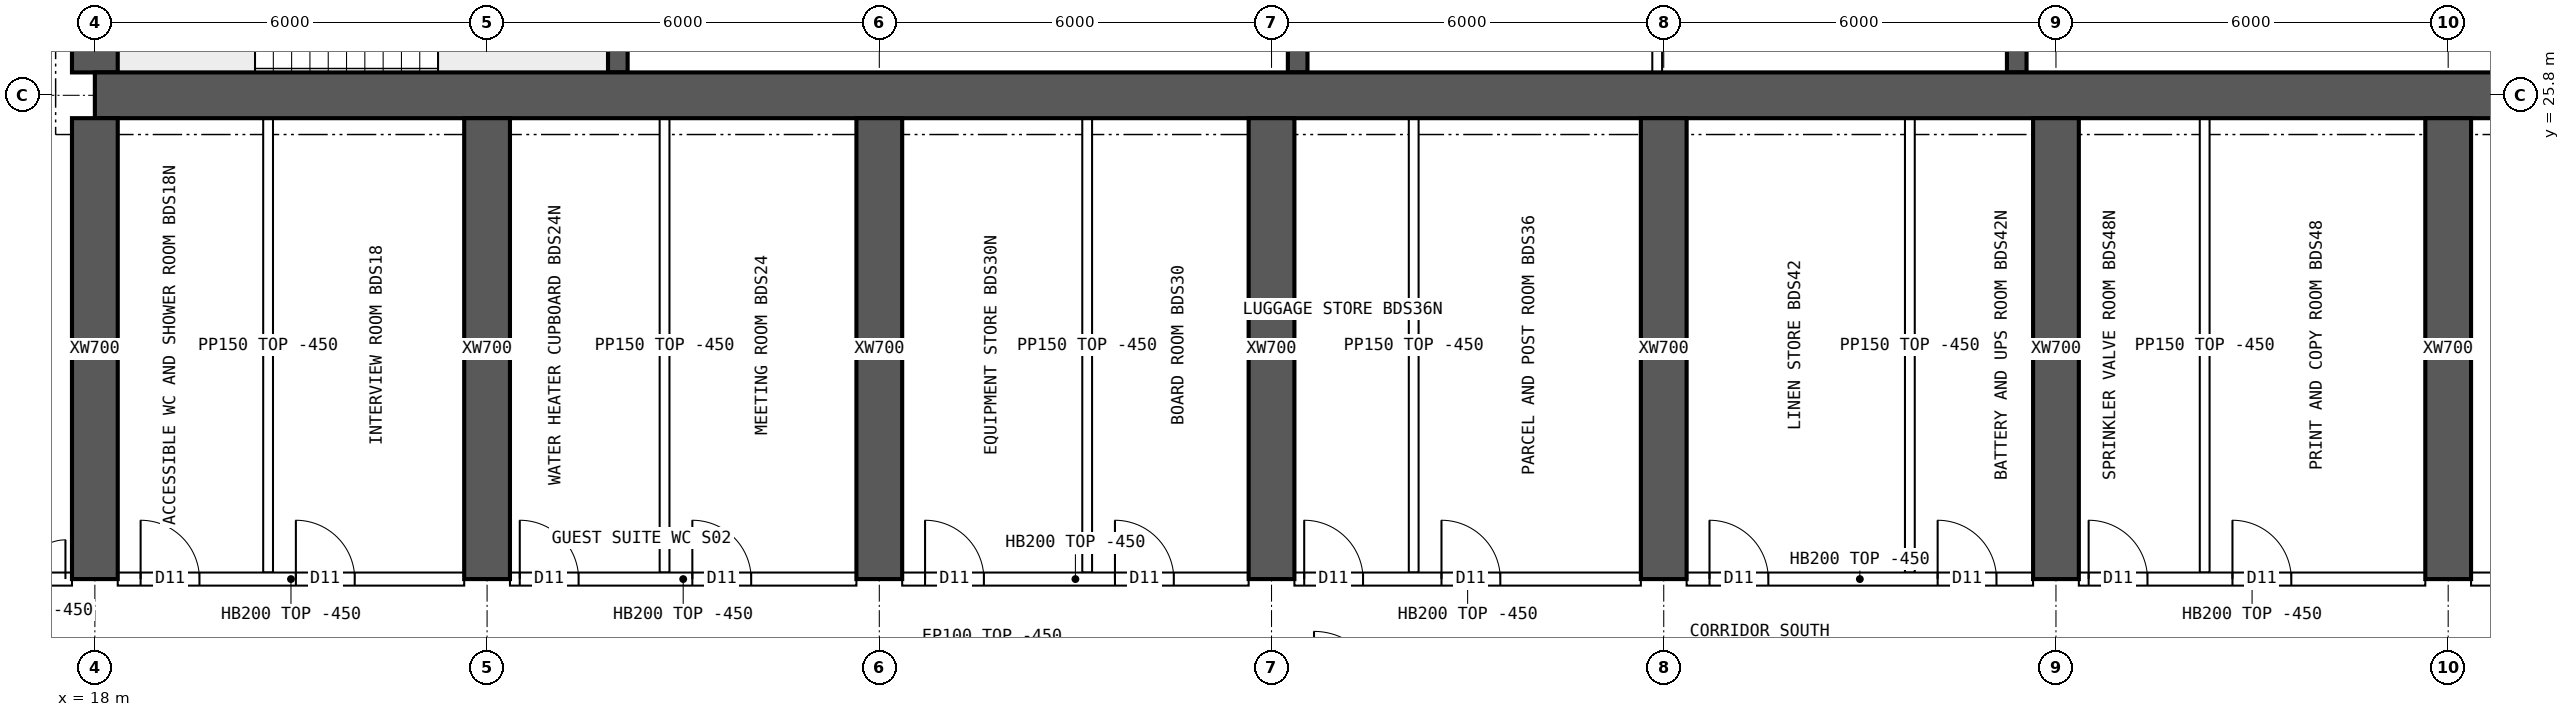
"""IFC4 building model, lengths in metres.
Left out: names, types, materials, properties, quantities, classifications, styles, units other than length and angle.
Written with IfcOpenShell. Run it as: python <this file> out.ifc"""

import sys

from ifc_helpers import new_model, si_unit, direction, frame, frame_2d, origin, place, context, subcontext, project, spatial, rectangle, extrude, element, fill, save


model = new_model("IFC4")
c1 = context("Model", 3, precision=1e-05, world=origin(), true_north=direction((0.0, 1.0)))
c2 = subcontext(c1, "Body", "Model", "MODEL_VIEW")
j1 = project(units=[si_unit("LENGTHUNIT", "METRE"), si_unit("PLANEANGLEUNIT", "RADIAN")], contexts=[c1])
p1 = place(None, origin())
s1 = spatial("IfcSite", under=j1, at=p1, CompositionType="ELEMENT")
p2 = place(p1, origin())
s2 = spatial("IfcBuilding", under=s1, at=p2, CompositionType="ELEMENT")
p3 = place(p2, frame((0.0, 0.0, 242.8)))
s3 = spatial("IfcBuildingStorey", under=s2, at=p3, CompositionType="ELEMENT", Elevation=242.8)
p4 = place(p3, frame((18.0, 25.8, 0.0), z_axis=(0.0, 0.0, 1.0), x_axis=(1.0, 0.0, 0.0)))
e1 = element("IfcWall", 1, at=p4, inside=s3, PredefinedType="SHEAR", context=c2, shape_type="SweptSolid", body=[
    extrude(rectangle(XDim=48.0, YDim=0.7, at=frame_2d((24.0, 0.0))), origin(), (0.0, 0.0, 1.0), 3.75),
])
p5 = place(p3, frame((18.0, 26.15, 0.0), z_axis=(0.0, 0.0, 1.0), x_axis=(0.0, 1.0, 0.0)))
e2 = element("IfcWall", 2, at=p5, inside=s3, PredefinedType="SHEAR", context=c2, shape_type="SweptSolid", body=[
    extrude(rectangle(XDim=11.7, YDim=0.7, at=frame_2d((5.85, 0.0))), origin(), (0.0, 0.0, 1.0), 3.75),
])
p6 = place(p5, frame((5.15, 0.0, 0.0)))
e3 = element("IfcOpeningElement", 3, at=p6, cuts=e2, PredefinedType="OPENING", context=c2, shape_type="SweptSolid", body=[
    extrude(rectangle(XDim=1.2, YDim=2.1, at=frame_2d((0.6, 1.05))), frame((0.0, 0.36, 0.0), z_axis=(0.0, -1.0, 0.0), x_axis=(1.0, 0.0, 0.0)), (0.0, 0.0, 1.0), 0.72),
])
for number, where, z_axis, x_axis in (
    (4, (26.0, 26.15, 0.0), (0.0, 0.0, 1.0), (0.0, 1.0, 0.0)),
    (5, (36.4, 26.15, 0.0), (0.0, 0.0, 1.0), (0.0, 1.0, 0.0)),
    (6, (47.4, 26.15, 0.0), (0.0, 0.0, 1.0), (0.0, 1.0, 0.0)),
):
    element("IfcWall", number, at=place(p3, frame(where, z_axis=z_axis, x_axis=x_axis)), inside=s3, PredefinedType="SHEAR", context=c2, shape_type="SweptSolid", body=[
        extrude(rectangle(XDim=4.1, YDim=0.3, at=frame_2d((2.05, 0.0))), origin(), (0.0, 0.0, 1.0), 3.75),
    ])
for number, where, z_axis, x_axis in (
    (7, (18.0, 18.4, 0.0), (0.0, 0.0, 1.0), (0.0, 1.0, 0.0)),
    (8, (24.0, 18.4, 0.0), (0.0, 0.0, 1.0), (0.0, 1.0, 0.0)),
    (9, (30.0, 18.4, 0.0), (0.0, 0.0, 1.0), (0.0, 1.0, 0.0)),
    (10, (36.0, 18.4, 0.0), (0.0, 0.0, 1.0), (0.0, 1.0, 0.0)),
    (11, (42.0, 18.4, 0.0), (0.0, 0.0, 1.0), (0.0, 1.0, 0.0)),
    (12, (48.0, 18.4, 0.0), (0.0, 0.0, 1.0), (0.0, 1.0, 0.0)),
    (13, (54.0, 18.4, 0.0), (0.0, 0.0, 1.0), (0.0, 1.0, 0.0)),
):
    element("IfcWall", number, at=place(p3, frame(where, z_axis=z_axis, x_axis=x_axis)), inside=s3, PredefinedType="SHEAR", context=c2, shape_type="SweptSolid", body=[
        extrude(rectangle(XDim=7.05, YDim=0.7, at=frame_2d((3.525, 0.0))), origin(), (0.0, 0.0, 1.0), 3.75),
    ])
p7 = place(p3, frame((41.9, 26.15, 0.0), z_axis=(0.0, 0.0, 1.0), x_axis=(0.0, 1.0, 0.0)))
e14 = element("IfcWall", 14, at=p7, inside=s3, PredefinedType="SOLIDWALL", context=c2, shape_type="SweptSolid", body=[
    extrude(rectangle(XDim=4.1, YDim=0.15, at=frame_2d((2.05, 0.0))), origin(), (0.0, 0.0, 1.0), 3.3),
])
p8 = place(p3, frame((15.6, 18.4, 0.0), z_axis=(0.0, 0.0, 1.0), x_axis=(1.0, 0.0, 0.0)))
e15 = element("IfcWall", 15, at=p8, inside=s3, PredefinedType="SOLIDWALL", context=c2, shape_type="SweptSolid", body=[
    extrude(rectangle(XDim=2.05, YDim=0.2, at=frame_2d((1.025, 0.0))), origin(), (0.0, 0.0, 1.0), 3.3),
])
p9 = place(p8, frame((0.75, 0.0, 0.0)))
e16 = element("IfcOpeningElement", 16, at=p9, cuts=e15, PredefinedType="OPENING", context=c2, shape_type="SweptSolid", body=[
    extrude(rectangle(XDim=1.2, YDim=2.1, at=frame_2d((0.6, 1.05))), frame((0.0, 0.11, 0.0), z_axis=(0.0, -1.0, 0.0), x_axis=(1.0, 0.0, 0.0)), (0.0, 0.0, 1.0), 0.22),
])
p10 = place(p3, frame((18.35, 18.4, 0.0), z_axis=(0.0, 0.0, 1.0), x_axis=(1.0, 0.0, 0.0)))
e17 = element("IfcWall", 17, at=p10, inside=s3, PredefinedType="SOLIDWALL", context=c2, shape_type="SweptSolid", body=[
    extrude(rectangle(XDim=5.3, YDim=0.2, at=frame_2d((2.65, 0.0))), origin(), (0.0, 0.0, 1.0), 3.3),
])
p11 = place(p10, frame((0.35, 0.0, 0.0)))
e18 = element("IfcOpeningElement", 18, at=p11, cuts=e17, PredefinedType="OPENING", context=c2, shape_type="SweptSolid", body=[
    extrude(rectangle(XDim=0.9, YDim=2.1, at=frame_2d((0.45, 1.05))), frame((0.0, 0.11, 0.0), z_axis=(0.0, -1.0, 0.0), x_axis=(1.0, 0.0, 0.0)), (0.0, 0.0, 1.0), 0.22),
])
p12 = place(p10, frame((2.725, 0.0, 0.0)))
e19 = element("IfcOpeningElement", 19, at=p12, cuts=e17, PredefinedType="OPENING", context=c2, shape_type="SweptSolid", body=[
    extrude(rectangle(XDim=0.9, YDim=2.1, at=frame_2d((0.45, 1.05))), frame((0.0, 0.11, 0.0), z_axis=(0.0, -1.0, 0.0), x_axis=(1.0, 0.0, 0.0)), (0.0, 0.0, 1.0), 0.22),
])
p13 = place(p3, frame((24.35, 18.4, 0.0), z_axis=(0.0, 0.0, 1.0), x_axis=(1.0, 0.0, 0.0)))
e20 = element("IfcWall", 20, at=p13, inside=s3, PredefinedType="SOLIDWALL", context=c2, shape_type="SweptSolid", body=[
    extrude(rectangle(XDim=5.3, YDim=0.2, at=frame_2d((2.65, 0.0))), origin(), (0.0, 0.0, 1.0), 3.3),
])
p14 = place(p13, frame((0.15, 0.0, 0.0)))
e21 = element("IfcOpeningElement", 21, at=p14, cuts=e20, PredefinedType="OPENING", context=c2, shape_type="SweptSolid", body=[
    extrude(rectangle(XDim=0.9, YDim=2.1, at=frame_2d((0.45, 1.05))), frame((0.0, 0.11, 0.0), z_axis=(0.0, -1.0, 0.0), x_axis=(1.0, 0.0, 0.0)), (0.0, 0.0, 1.0), 0.22),
])
p15 = place(p13, frame((2.79, 0.0, 0.0)))
e22 = element("IfcOpeningElement", 22, at=p15, cuts=e20, PredefinedType="OPENING", context=c2, shape_type="SweptSolid", body=[
    extrude(rectangle(XDim=0.9, YDim=2.1, at=frame_2d((0.45, 1.05))), frame((0.0, 0.11, 0.0), z_axis=(0.0, -1.0, 0.0), x_axis=(1.0, 0.0, 0.0)), (0.0, 0.0, 1.0), 0.22),
])
p16 = place(p3, frame((30.35, 18.4, 0.0), z_axis=(0.0, 0.0, 1.0), x_axis=(1.0, 0.0, 0.0)))
e23 = element("IfcWall", 23, at=p16, inside=s3, PredefinedType="SOLIDWALL", context=c2, shape_type="SweptSolid", body=[
    extrude(rectangle(XDim=5.3, YDim=0.2, at=frame_2d((2.65, 0.0))), origin(), (0.0, 0.0, 1.0), 3.3),
])
p17 = place(p16, frame((0.35, 0.0, 0.0)))
e24 = element("IfcOpeningElement", 24, at=p17, cuts=e23, PredefinedType="OPENING", context=c2, shape_type="SweptSolid", body=[
    extrude(rectangle(XDim=0.9, YDim=2.1, at=frame_2d((0.45, 1.05))), frame((0.0, 0.11, 0.0), z_axis=(0.0, -1.0, 0.0), x_axis=(1.0, 0.0, 0.0)), (0.0, 0.0, 1.0), 0.22),
])
p18 = place(p16, frame((3.255, 0.0, 0.0)))
e25 = element("IfcOpeningElement", 25, at=p18, cuts=e23, PredefinedType="OPENING", context=c2, shape_type="SweptSolid", body=[
    extrude(rectangle(XDim=0.9, YDim=2.1, at=frame_2d((0.45, 1.05))), frame((0.0, 0.11, 0.0), z_axis=(0.0, -1.0, 0.0), x_axis=(1.0, 0.0, 0.0)), (0.0, 0.0, 1.0), 0.22),
])
p19 = place(p3, frame((36.35, 18.4, 0.0), z_axis=(0.0, 0.0, 1.0), x_axis=(1.0, 0.0, 0.0)))
e26 = element("IfcWall", 26, at=p19, inside=s3, PredefinedType="SOLIDWALL", context=c2, shape_type="SweptSolid", body=[
    extrude(rectangle(XDim=5.3, YDim=0.2, at=frame_2d((2.65, 0.0))), origin(), (0.0, 0.0, 1.0), 3.3),
])
p20 = place(p19, frame((0.15, 0.0, 0.0)))
e27 = element("IfcOpeningElement", 27, at=p20, cuts=e26, PredefinedType="OPENING", context=c2, shape_type="SweptSolid", body=[
    extrude(rectangle(XDim=0.9, YDim=2.1, at=frame_2d((0.45, 1.05))), frame((0.0, 0.11, 0.0), z_axis=(0.0, -1.0, 0.0), x_axis=(1.0, 0.0, 0.0)), (0.0, 0.0, 1.0), 0.22),
])
p21 = place(p19, frame((2.25, 0.0, 0.0)))
e28 = element("IfcOpeningElement", 28, at=p21, cuts=e26, PredefinedType="OPENING", context=c2, shape_type="SweptSolid", body=[
    extrude(rectangle(XDim=0.9, YDim=2.1, at=frame_2d((0.45, 1.05))), frame((0.0, 0.11, 0.0), z_axis=(0.0, -1.0, 0.0), x_axis=(1.0, 0.0, 0.0)), (0.0, 0.0, 1.0), 0.22),
])
p22 = place(p3, frame((42.35, 18.4, 0.0), z_axis=(0.0, 0.0, 1.0), x_axis=(1.0, 0.0, 0.0)))
e29 = element("IfcWall", 29, at=p22, inside=s3, PredefinedType="SOLIDWALL", context=c2, shape_type="SweptSolid", body=[
    extrude(rectangle(XDim=5.3, YDim=0.2, at=frame_2d((2.65, 0.0))), origin(), (0.0, 0.0, 1.0), 3.3),
])
p23 = place(p22, frame((0.35, 0.0, 0.0)))
e30 = element("IfcOpeningElement", 30, at=p23, cuts=e29, PredefinedType="OPENING", context=c2, shape_type="SweptSolid", body=[
    extrude(rectangle(XDim=0.9, YDim=2.1, at=frame_2d((0.45, 1.05))), frame((0.0, 0.11, 0.0), z_axis=(0.0, -1.0, 0.0), x_axis=(1.0, 0.0, 0.0)), (0.0, 0.0, 1.0), 0.22),
])
p24 = place(p22, frame((3.84, 0.0, 0.0)))
e31 = element("IfcOpeningElement", 31, at=p24, cuts=e29, PredefinedType="OPENING", context=c2, shape_type="SweptSolid", body=[
    extrude(rectangle(XDim=0.9, YDim=2.1, at=frame_2d((0.45, 1.05))), frame((0.0, 0.11, 0.0), z_axis=(0.0, -1.0, 0.0), x_axis=(1.0, 0.0, 0.0)), (0.0, 0.0, 1.0), 0.22),
])
p25 = place(p3, frame((48.35, 18.4, 0.0), z_axis=(0.0, 0.0, 1.0), x_axis=(1.0, 0.0, 0.0)))
e32 = element("IfcWall", 32, at=p25, inside=s3, PredefinedType="SOLIDWALL", context=c2, shape_type="SweptSolid", body=[
    extrude(rectangle(XDim=5.3, YDim=0.2, at=frame_2d((2.65, 0.0))), origin(), (0.0, 0.0, 1.0), 3.3),
])
p26 = place(p25, frame((0.15, 0.0, 0.0)))
e33 = element("IfcOpeningElement", 33, at=p26, cuts=e32, PredefinedType="OPENING", context=c2, shape_type="SweptSolid", body=[
    extrude(rectangle(XDim=0.9, YDim=2.1, at=frame_2d((0.45, 1.05))), frame((0.0, 0.11, 0.0), z_axis=(0.0, -1.0, 0.0), x_axis=(1.0, 0.0, 0.0)), (0.0, 0.0, 1.0), 0.22),
])
p27 = place(p25, frame((2.35, 0.0, 0.0)))
e34 = element("IfcOpeningElement", 34, at=p27, cuts=e32, PredefinedType="OPENING", context=c2, shape_type="SweptSolid", body=[
    extrude(rectangle(XDim=0.9, YDim=2.1, at=frame_2d((0.45, 1.05))), frame((0.0, 0.11, 0.0), z_axis=(0.0, -1.0, 0.0), x_axis=(1.0, 0.0, 0.0)), (0.0, 0.0, 1.0), 0.22),
])
p28 = place(p3, frame((54.35, 18.4, 0.0), z_axis=(0.0, 0.0, 1.0), x_axis=(1.0, 0.0, 0.0)))
e35 = element("IfcWall", 35, at=p28, inside=s3, PredefinedType="SOLIDWALL", context=c2, shape_type="SweptSolid", body=[
    extrude(rectangle(XDim=5.3, YDim=0.2, at=frame_2d((2.65, 0.0))), origin(), (0.0, 0.0, 1.0), 3.3),
])
p29 = place(p28, frame((0.8, 0.0, 0.0)))
e36 = element("IfcOpeningElement", 36, at=p29, cuts=e35, PredefinedType="OPENING", context=c2, shape_type="SweptSolid", body=[
    extrude(rectangle(XDim=1.0, YDim=2.1, at=frame_2d((0.5, 1.05))), frame((0.0, 0.11, 0.0), z_axis=(0.0, -1.0, 0.0), x_axis=(1.0, 0.0, 0.0)), (0.0, 0.0, 1.0), 0.22),
])
for number, where, z_axis, x_axis in (
    (37, (20.65, 18.5, 0.0), (0.0, 0.0, 1.0), (0.0, 1.0, 0.0)),
    (38, (26.715, 18.5, 0.0), (0.0, 0.0, 1.0), (0.0, 1.0, 0.0)),
    (39, (33.18, 18.5, 0.0), (0.0, 0.0, 1.0), (0.0, 1.0, 0.0)),
    (40, (38.175, 18.5, 0.0), (0.0, 0.0, 1.0), (0.0, 1.0, 0.0)),
    (41, (45.765, 18.5, 0.0), (0.0, 0.0, 1.0), (0.0, 1.0, 0.0)),
    (42, (50.275, 18.5, 0.0), (0.0, 0.0, 1.0), (0.0, 1.0, 0.0)),
):
    element("IfcWall", number, at=place(p3, frame(where, z_axis=z_axis, x_axis=x_axis)), inside=s3, PredefinedType="PARTITIONING", context=c2, shape_type="SweptSolid", body=[
        extrude(rectangle(XDim=6.95, YDim=0.15, at=frame_2d((3.475, 0.0))), origin(), (0.0, 0.0, 1.0), 3.3),
    ])
p30 = place(p9, origin())
e43 = element("IfcDoor", 43, at=p30, inside=s3, OperationType="DOUBLE_DOOR_SINGLE_SWING", PredefinedType="DOOR", context=c2, shape_type="SweptSolid", body=[
    extrude(rectangle(XDim=1.2, YDim=2.1, at=frame_2d((0.6, 1.05))), frame((0.0, 0.025, 0.0), z_axis=(0.0, -1.0, 0.0), x_axis=(1.0, 0.0, 0.0)), (0.0, 0.0, 1.0), 0.05),
])
fill(e16, e43)
p31 = place(p11, origin())
e44 = element("IfcDoor", 44, at=p31, inside=s3, OperationType="SINGLE_SWING_LEFT", PredefinedType="DOOR", context=c2, shape_type="SweptSolid", body=[
    extrude(rectangle(XDim=0.9, YDim=2.1, at=frame_2d((0.45, 1.05))), frame((0.0, 0.025, 0.0), z_axis=(0.0, -1.0, 0.0), x_axis=(1.0, 0.0, 0.0)), (0.0, 0.0, 1.0), 0.05),
])
fill(e18, e44)
p32 = place(p12, origin())
e45 = element("IfcDoor", 45, at=p32, inside=s3, OperationType="SINGLE_SWING_LEFT", PredefinedType="DOOR", context=c2, shape_type="SweptSolid", body=[
    extrude(rectangle(XDim=0.9, YDim=2.1, at=frame_2d((0.45, 1.05))), frame((0.0, 0.025, 0.0), z_axis=(0.0, -1.0, 0.0), x_axis=(1.0, 0.0, 0.0)), (0.0, 0.0, 1.0), 0.05),
])
fill(e19, e45)
p33 = place(p14, origin())
e46 = element("IfcDoor", 46, at=p33, inside=s3, OperationType="SINGLE_SWING_LEFT", PredefinedType="DOOR", context=c2, shape_type="SweptSolid", body=[
    extrude(rectangle(XDim=0.9, YDim=2.1, at=frame_2d((0.45, 1.05))), frame((0.0, 0.025, 0.0), z_axis=(0.0, -1.0, 0.0), x_axis=(1.0, 0.0, 0.0)), (0.0, 0.0, 1.0), 0.05),
])
fill(e21, e46)
p34 = place(p15, origin())
e47 = element("IfcDoor", 47, at=p34, inside=s3, OperationType="SINGLE_SWING_LEFT", PredefinedType="DOOR", context=c2, shape_type="SweptSolid", body=[
    extrude(rectangle(XDim=0.9, YDim=2.1, at=frame_2d((0.45, 1.05))), frame((0.0, 0.025, 0.0), z_axis=(0.0, -1.0, 0.0), x_axis=(1.0, 0.0, 0.0)), (0.0, 0.0, 1.0), 0.05),
])
fill(e22, e47)
p35 = place(p17, origin())
e48 = element("IfcDoor", 48, at=p35, inside=s3, OperationType="SINGLE_SWING_LEFT", PredefinedType="DOOR", context=c2, shape_type="SweptSolid", body=[
    extrude(rectangle(XDim=0.9, YDim=2.1, at=frame_2d((0.45, 1.05))), frame((0.0, 0.025, 0.0), z_axis=(0.0, -1.0, 0.0), x_axis=(1.0, 0.0, 0.0)), (0.0, 0.0, 1.0), 0.05),
])
fill(e24, e48)
p36 = place(p18, origin())
e49 = element("IfcDoor", 49, at=p36, inside=s3, OperationType="SINGLE_SWING_LEFT", PredefinedType="DOOR", context=c2, shape_type="SweptSolid", body=[
    extrude(rectangle(XDim=0.9, YDim=2.1, at=frame_2d((0.45, 1.05))), frame((0.0, 0.025, 0.0), z_axis=(0.0, -1.0, 0.0), x_axis=(1.0, 0.0, 0.0)), (0.0, 0.0, 1.0), 0.05),
])
fill(e25, e49)
p37 = place(p20, origin())
e50 = element("IfcDoor", 50, at=p37, inside=s3, OperationType="SINGLE_SWING_LEFT", PredefinedType="DOOR", context=c2, shape_type="SweptSolid", body=[
    extrude(rectangle(XDim=0.9, YDim=2.1, at=frame_2d((0.45, 1.05))), frame((0.0, 0.025, 0.0), z_axis=(0.0, -1.0, 0.0), x_axis=(1.0, 0.0, 0.0)), (0.0, 0.0, 1.0), 0.05),
])
fill(e27, e50)
p38 = place(p21, origin())
e51 = element("IfcDoor", 51, at=p38, inside=s3, OperationType="SINGLE_SWING_LEFT", PredefinedType="DOOR", context=c2, shape_type="SweptSolid", body=[
    extrude(rectangle(XDim=0.9, YDim=2.1, at=frame_2d((0.45, 1.05))), frame((0.0, 0.025, 0.0), z_axis=(0.0, -1.0, 0.0), x_axis=(1.0, 0.0, 0.0)), (0.0, 0.0, 1.0), 0.05),
])
fill(e28, e51)
p39 = place(p23, origin())
e52 = element("IfcDoor", 52, at=p39, inside=s3, OperationType="SINGLE_SWING_LEFT", PredefinedType="DOOR", context=c2, shape_type="SweptSolid", body=[
    extrude(rectangle(XDim=0.9, YDim=2.1, at=frame_2d((0.45, 1.05))), frame((0.0, 0.025, 0.0), z_axis=(0.0, -1.0, 0.0), x_axis=(1.0, 0.0, 0.0)), (0.0, 0.0, 1.0), 0.05),
])
fill(e30, e52)
p40 = place(p24, origin())
e53 = element("IfcDoor", 53, at=p40, inside=s3, OperationType="SINGLE_SWING_LEFT", PredefinedType="DOOR", context=c2, shape_type="SweptSolid", body=[
    extrude(rectangle(XDim=0.9, YDim=2.1, at=frame_2d((0.45, 1.05))), frame((0.0, 0.025, 0.0), z_axis=(0.0, -1.0, 0.0), x_axis=(1.0, 0.0, 0.0)), (0.0, 0.0, 1.0), 0.05),
])
fill(e31, e53)
p41 = place(p26, origin())
e54 = element("IfcDoor", 54, at=p41, inside=s3, OperationType="SINGLE_SWING_LEFT", PredefinedType="DOOR", context=c2, shape_type="SweptSolid", body=[
    extrude(rectangle(XDim=0.9, YDim=2.1, at=frame_2d((0.45, 1.05))), frame((0.0, 0.025, 0.0), z_axis=(0.0, -1.0, 0.0), x_axis=(1.0, 0.0, 0.0)), (0.0, 0.0, 1.0), 0.05),
])
fill(e33, e54)
p42 = place(p27, origin())
e55 = element("IfcDoor", 55, at=p42, inside=s3, OperationType="SINGLE_SWING_LEFT", PredefinedType="DOOR", context=c2, shape_type="SweptSolid", body=[
    extrude(rectangle(XDim=0.9, YDim=2.1, at=frame_2d((0.45, 1.05))), frame((0.0, 0.025, 0.0), z_axis=(0.0, -1.0, 0.0), x_axis=(1.0, 0.0, 0.0)), (0.0, 0.0, 1.0), 0.05),
])
fill(e34, e55)
save(model, sys.argv[1])
